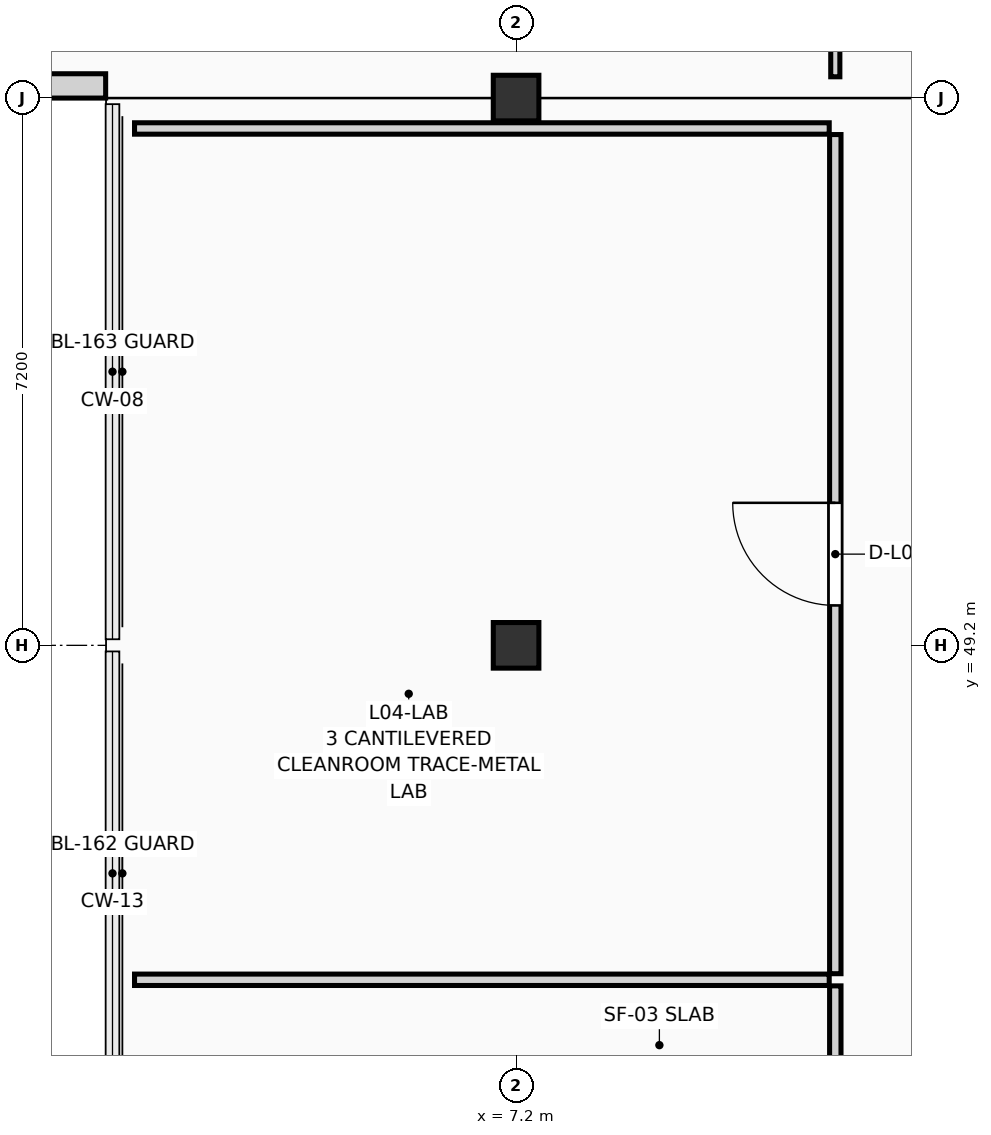
"""IFC4 building model, lengths in metres.
Left out: names, types, materials, properties, quantities, classifications, styles, units other than length and angle.
Written with IfcOpenShell. Run it as: python <this file> out.ifc"""

import sys

from ifc_helpers import new_model, si_unit, direction, frame, frame_2d, origin, origin_2d, place, context, subcontext, project, spatial, rectangle, extrude, element, fill, save


model = new_model("IFC4")
c1 = context("Model", 3, precision=1e-05, world=origin(), true_north=direction((0.0, 1.0)))
c2 = subcontext(c1, "Body", "Model", "MODEL_VIEW")
j1 = project(units=[si_unit("LENGTHUNIT", "METRE"), si_unit("PLANEANGLEUNIT", "RADIAN")], contexts=[c1])
p1 = place(None, origin())
s1 = spatial("IfcSite", under=j1, at=p1, CompositionType="ELEMENT")
p2 = place(p1, origin())
s2 = spatial("IfcBuilding", under=s1, at=p2, CompositionType="ELEMENT")
p3 = place(p2, frame((0.0, 0.0, 15.75)))
s3 = spatial("IfcBuildingStorey", under=s2, at=p3, CompositionType="ELEMENT", Elevation=15.75)
for number, where, z_axis, x_axis in (
    (1, (7.2, 49.2, 0.0), (0.0, 0.0, 1.0), (1.0, 0.0, 0.0)),
    (2, (7.2, 56.4, 0.0), (0.0, 0.0, 1.0), (1.0, 0.0, 0.0)),
):
    element("IfcColumn", number, at=place(p3, frame(where, z_axis=z_axis, x_axis=x_axis)), inside=s3, PredefinedType="COLUMN", context=c2, shape_type="SweptSolid", body=[
        extrude(rectangle(XDim=0.6, YDim=0.6, at=origin_2d()), origin(), (0.0, 0.0, 1.0), 3.6),
    ])
p4 = place(p3, frame((0.0, 56.56, 0.0), z_axis=(0.0, 0.0, 1.0), x_axis=(1.0, 0.0, 0.0)))
e3 = element("IfcWall", 3, at=p4, inside=s3, PredefinedType="SOLIDWALL", context=c2, shape_type="SweptSolid", body=[
    extrude(rectangle(XDim=1.8, YDim=0.32, at=frame_2d((0.9, 0.0))), origin(), (0.0, 0.0, 1.0), 3.38),
])
p5 = place(p3, frame((11.4, 33.48, 0.0), z_axis=(0.0, 0.0, 1.0), x_axis=(0.0, 1.0, 0.0)))
e4 = element("IfcWall", 4, at=p5, inside=s3, PredefinedType="PARTITIONING", context=c2, shape_type="SweptSolid", body=[
    extrude(rectangle(XDim=11.24, YDim=0.15, at=frame_2d((5.62, 0.0))), origin(), (0.0, 0.0, 1.0), 3.375),
])
p6 = place(p5, frame((4.945, 0.0, 0.0)))
e5 = element("IfcOpeningElement", 5, at=p6, cuts=e4, PredefinedType="OPENING", context=c2, shape_type="SweptSolid", body=[
    extrude(rectangle(XDim=1.35, YDim=2.2, at=frame_2d((0.675, 1.1))), frame((0.0, 0.087, 0.0), z_axis=(0.0, -1.0, 0.0), x_axis=(1.0, 0.0, 0.0)), (0.0, 0.0, 1.0), 0.174),
])
p7 = place(p3, frame((2.18, 44.8, 0.0), z_axis=(0.0, 0.0, 1.0), x_axis=(1.0, 0.0, 0.0)))
e6 = element("IfcWall", 6, at=p7, inside=s3, PredefinedType="PARTITIONING", context=c2, shape_type="SweptSolid", body=[
    extrude(rectangle(XDim=9.14, YDim=0.15, at=frame_2d((4.57, 0.0))), origin(), (0.0, 0.0, 1.0), 3.375),
])
p8 = place(p3, frame((11.4, 44.88, 0.0), z_axis=(0.0, 0.0, 1.0), x_axis=(0.0, 1.0, 0.0)))
e7 = element("IfcWall", 7, at=p8, inside=s3, PredefinedType="PARTITIONING", context=c2, shape_type="SweptSolid", body=[
    extrude(rectangle(XDim=11.04, YDim=0.15, at=frame_2d((5.52, 0.0))), origin(), (0.0, 0.0, 1.0), 3.375),
])
p9 = place(p8, frame((4.845, 0.0, 0.0)))
e8 = element("IfcOpeningElement", 8, at=p9, cuts=e7, PredefinedType="OPENING", context=c2, shape_type="SweptSolid", body=[
    extrude(rectangle(XDim=1.35, YDim=2.2, at=frame_2d((0.675, 1.1))), frame((0.0, 0.087, 0.0), z_axis=(0.0, -1.0, 0.0), x_axis=(1.0, 0.0, 0.0)), (0.0, 0.0, 1.0), 0.174),
])
p10 = place(p3, frame((2.18, 56.0, 0.0), z_axis=(0.0, 0.0, 1.0), x_axis=(1.0, 0.0, 0.0)))
e9 = element("IfcWall", 9, at=p10, inside=s3, PredefinedType="PARTITIONING", context=c2, shape_type="SweptSolid", body=[
    extrude(rectangle(XDim=9.14, YDim=0.15, at=frame_2d((4.57, 0.0))), origin(), (0.0, 0.0, 1.0), 3.375),
])
p11 = place(p3, frame((11.4, 56.68, 0.0), z_axis=(0.0, 0.0, 1.0), x_axis=(0.0, 1.0, 0.0)))
e10 = element("IfcWall", 10, at=p11, inside=s3, PredefinedType="PARTITIONING", context=c2, shape_type="SweptSolid", body=[
    extrude(rectangle(XDim=28.44, YDim=0.12, at=frame_2d((14.22, 0.0))), origin(), (0.0, 0.0, 1.0), 3.375),
])
p12 = place(p11, frame((13.37, 0.0, 0.0)))
e11 = element("IfcOpeningElement", 11, at=p12, cuts=e10, PredefinedType="OPENING", context=c2, shape_type="SweptSolid", body=[
    extrude(rectangle(XDim=1.7, YDim=2.28, at=frame_2d((0.85, 1.14))), frame((0.0, 0.072, 0.0), z_axis=(0.0, -1.0, 0.0), x_axis=(1.0, 0.0, 0.0)), (0.0, 0.0, 1.0), 0.144),
])
p13 = place(p9, origin())
e12 = element("IfcDoor", 12, at=p13, inside=s3, OperationType="SINGLE_SWING_RIGHT", PredefinedType="DOOR", context=c2, shape_type="SweptSolid", body=[
    extrude(rectangle(XDim=1.35, YDim=2.2, at=frame_2d((0.675, 1.1))), frame((0.0, 0.025, 0.0), z_axis=(0.0, -1.0, 0.0), x_axis=(1.0, 0.0, 0.0)), (0.0, 0.0, 1.0), 0.05),
])
fill(e8, e12)
save(model, sys.argv[1])
